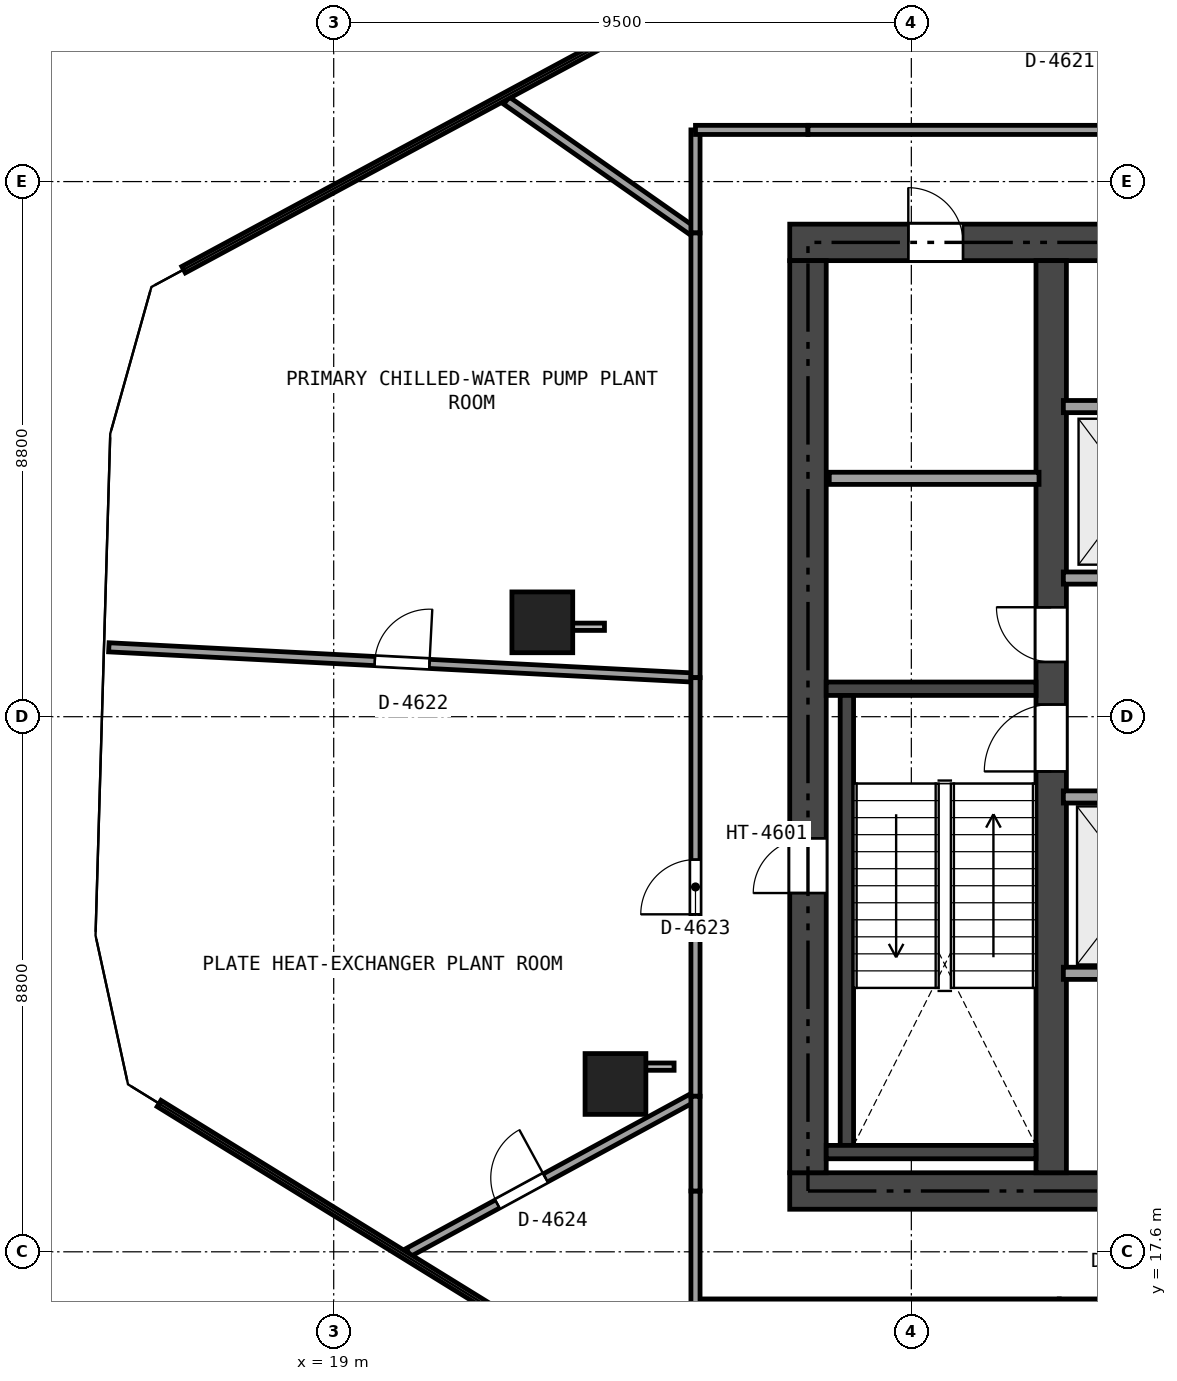
"""IFC4 building model, lengths in metres.
Left out: names, types, materials, properties, quantities, classifications, styles, units other than length and angle.
Written with IfcOpenShell. Run it as: python <this file> out.ifc"""

import sys

from ifc_helpers import new_model, si_unit, direction, frame, frame_2d, origin, origin_2d, place, context, subcontext, project, spatial, rectangle, extrude, element, fill, save


model = new_model("IFC4")
c1 = context("Model", 3, precision=1e-05, world=origin(), true_north=direction((0.0, 1.0)))
c2 = subcontext(c1, "Body", "Model", "MODEL_VIEW")
j1 = project(units=[si_unit("LENGTHUNIT", "METRE"), si_unit("PLANEANGLEUNIT", "RADIAN")], contexts=[c1])
p1 = place(None, origin())
s1 = spatial("IfcSite", under=j1, at=p1, CompositionType="ELEMENT")
p2 = place(p1, origin())
s2 = spatial("IfcBuilding", under=s1, at=p2, CompositionType="ELEMENT")
p3 = place(p2, frame((0.0, 0.0, 172.5)))
s3 = spatial("IfcBuildingStorey", under=s2, at=p3, CompositionType="ELEMENT", Elevation=172.5)
p4 = place(p3, frame((26.5, 18.6, 0.0), z_axis=(0.0, 0.0, 1.0), x_axis=(1.0, 0.0, 0.0)))
e1 = element("IfcWall", 1, at=p4, inside=s3, PredefinedType="SHEAR", context=c2, shape_type="SweptSolid", body=[
    extrude(rectangle(XDim=21.4, YDim=0.6, at=frame_2d((10.7, 0.0))), origin(), (0.0, 0.0, 1.0), 4.08),
])
p5 = place(p4, frame((12.425, 0.0, 0.0)))
e2 = element("IfcOpeningElement", 2, at=p5, cuts=e1, PredefinedType="OPENING", context=c2, shape_type="SweptSolid", body=[
    extrude(rectangle(XDim=1.15, YDim=2.15, at=frame_2d((0.575, 1.075))), frame((0.0, 0.31, 0.0), z_axis=(0.0, -1.0, 0.0), x_axis=(1.0, 0.0, 0.0)), (0.0, 0.0, 1.0), 0.62),
])
p6 = place(p4, frame((5.25, 0.0, 0.0)))
e3 = element("IfcOpeningElement", 3, at=p6, cuts=e1, PredefinedType="OPENING", context=c2, shape_type="SweptSolid", body=[
    extrude(rectangle(XDim=0.9, YDim=2.1, at=frame_2d((0.45, 1.05))), frame((0.0, 0.31, 0.0), z_axis=(0.0, -1.0, 0.0), x_axis=(1.0, 0.0, 0.0)), (0.0, 0.0, 1.0), 0.62),
])
p7 = place(p3, frame((26.5, 34.2, 0.0), z_axis=(0.0, 0.0, 1.0), x_axis=(1.0, 0.0, 0.0)))
e4 = element("IfcWall", 4, at=p7, inside=s3, PredefinedType="SHEAR", context=c2, shape_type="SweptSolid", body=[
    extrude(rectangle(XDim=21.4, YDim=0.6, at=frame_2d((10.7, 0.0))), origin(), (0.0, 0.0, 1.0), 4.08),
])
p8 = place(p7, frame((9.7, 0.0, 0.0)))
e5 = element("IfcOpeningElement", 5, at=p8, cuts=e4, PredefinedType="OPENING", context=c2, shape_type="SweptSolid", body=[
    extrude(rectangle(XDim=1.1, YDim=2.15, at=frame_2d((0.55, 1.075))), frame((0.0, 0.31, 0.0), z_axis=(0.0, -1.0, 0.0), x_axis=(1.0, 0.0, 0.0)), (0.0, 0.0, 1.0), 0.62),
])
p9 = place(p7, frame((1.95, 0.0, 0.0)))
e6 = element("IfcOpeningElement", 6, at=p9, cuts=e4, PredefinedType="OPENING", context=c2, shape_type="SweptSolid", body=[
    extrude(rectangle(XDim=0.9, YDim=2.1, at=frame_2d((0.45, 1.05))), frame((0.0, 0.31, 0.0), z_axis=(0.0, -1.0, 0.0), x_axis=(1.0, 0.0, 0.0)), (0.0, 0.0, 1.0), 0.62),
])
p10 = place(p7, frame((6.25, 0.0, 0.0)))
e7 = element("IfcOpeningElement", 7, at=p10, cuts=e4, PredefinedType="OPENING", context=c2, shape_type="SweptSolid", body=[
    extrude(rectangle(XDim=0.9, YDim=2.1, at=frame_2d((0.45, 1.05))), frame((0.0, 0.31, 0.0), z_axis=(0.0, -1.0, 0.0), x_axis=(1.0, 0.0, 0.0)), (0.0, 0.0, 1.0), 0.62),
])
p11 = place(p3, frame((26.8, 18.9, 0.0), z_axis=(0.0, 0.0, 1.0), x_axis=(0.0, 1.0, 0.0)))
e8 = element("IfcWall", 8, at=p11, inside=s3, PredefinedType="SHEAR", context=c2, shape_type="SweptSolid", body=[
    extrude(rectangle(XDim=15.0, YDim=0.6, at=frame_2d((7.5, 0.0))), origin(), (0.0, 0.0, 1.0), 4.08),
])
p12 = place(p11, frame((4.6, 0.0, 0.02)))
e9 = element("IfcOpeningElement", 9, at=p12, cuts=e8, PredefinedType="OPENING", context=c2, shape_type="SweptSolid", body=[
    extrude(rectangle(XDim=0.9, YDim=2.02, at=frame_2d((0.45, 1.01))), frame((0.0, 0.31, 0.0), z_axis=(0.0, -1.0, 0.0), x_axis=(1.0, 0.0, 0.0)), (0.0, 0.0, 1.0), 0.62),
])
p13 = place(p3, frame((30.8, 18.9, 0.0), z_axis=(0.0, 0.0, 1.0), x_axis=(0.0, 1.0, 0.0)))
e10 = element("IfcWall", 10, at=p13, inside=s3, PredefinedType="SHEAR", context=c2, shape_type="SweptSolid", body=[
    extrude(rectangle(XDim=15.0, YDim=0.5, at=frame_2d((7.5, 0.0))), origin(), (0.0, 0.0, 1.0), 4.08),
])
p14 = place(p13, frame((6.6, 0.0, 0.0)))
e11 = element("IfcOpeningElement", 11, at=p14, cuts=e10, PredefinedType="OPENING", context=c2, shape_type="SweptSolid", body=[
    extrude(rectangle(XDim=1.1, YDim=2.15, at=frame_2d((0.55, 1.075))), frame((0.0, 0.26, 0.0), z_axis=(0.0, -1.0, 0.0), x_axis=(1.0, 0.0, 0.0)), (0.0, 0.0, 1.0), 0.52),
])
p15 = place(p13, frame((8.4, 0.0, 0.0)))
e12 = element("IfcOpeningElement", 12, at=p15, cuts=e10, PredefinedType="OPENING", context=c2, shape_type="SweptSolid", body=[
    extrude(rectangle(XDim=0.9, YDim=2.1, at=frame_2d((0.45, 1.05))), frame((0.0, 0.26, 0.0), z_axis=(0.0, -1.0, 0.0), x_axis=(1.0, 0.0, 0.0)), (0.0, 0.0, 1.0), 0.52),
])
p16 = place(p3, frame((27.1, 26.86, 0.0), z_axis=(0.0, 0.0, 1.0), x_axis=(1.0, 0.0, 0.0)))
e13 = element("IfcWall", 13, at=p16, inside=s3, PredefinedType="SHEAR", context=c2, shape_type="SweptSolid", body=[
    extrude(rectangle(XDim=3.45, YDim=0.22, at=frame_2d((1.725, 0.0))), origin(), (0.0, 0.0, 1.0), 4.08),
])
p17 = place(p3, frame((27.44, 19.35, 0.0), z_axis=(0.0, 0.0, 1.0), x_axis=(0.0, 1.0, 0.0)))
e14 = element("IfcWall", 14, at=p17, inside=s3, PredefinedType="SHEAR", context=c2, shape_type="SweptSolid", body=[
    extrude(rectangle(XDim=7.4, YDim=0.22, at=frame_2d((3.7, 0.0))), origin(), (0.0, 0.0, 1.0), 4.08),
])
p18 = place(p3, frame((27.1, 19.24, 0.0), z_axis=(0.0, 0.0, 1.0), x_axis=(1.0, 0.0, 0.0)))
e15 = element("IfcWall", 15, at=p18, inside=s3, PredefinedType="SHEAR", context=c2, shape_type="SweptSolid", body=[
    extrude(rectangle(XDim=3.45, YDim=0.22, at=frame_2d((1.725, 0.0))), origin(), (0.0, 0.0, 1.0), 4.08),
])
for number, where, z_axis, x_axis in (
    (16, (22.431, 27.952, 0.0), (0.0, 0.0, 1.0), (1.0, 0.0, 0.0)),
    (17, (23.634, 20.36, 0.0), (0.0, 0.0, 1.0), (1.0, 0.0, 0.0)),
):
    element("IfcColumn", number, at=place(p3, frame(where, z_axis=z_axis, x_axis=x_axis)), inside=s3, PredefinedType="COLUMN", context=c2, shape_type="SweptSolid", body=[
        extrude(rectangle(XDim=1.0, YDim=1.0, at=origin_2d()), origin(), (0.0, 0.0, 1.0), 4.08),
    ])
p19 = place(p3, frame((27.15, 30.32, 0.0), z_axis=(0.0, 0.0, 1.0), x_axis=(1.0, 0.0, 0.0)))
e18 = element("IfcWall", 18, at=p19, inside=s3, PredefinedType="SOLIDWALL", context=c2, shape_type="SweptSolid", body=[
    extrude(rectangle(XDim=3.45, YDim=0.2, at=frame_2d((1.725, 0.0))), origin(), (0.0, 0.0, 1.0), 4.08),
])
p20 = place(p3, frame((31.0, 28.68, 0.0), z_axis=(0.0, 0.0, 1.0), x_axis=(1.0, 0.0, 0.0)))
e19 = element("IfcWall", 19, at=p20, inside=s3, PredefinedType="SOLIDWALL", context=c2, shape_type="SweptSolid", body=[
    extrude(rectangle(XDim=4.42, YDim=0.2, at=frame_2d((2.21, 0.0))), origin(), (0.0, 0.0, 1.0), 4.08),
])
p21 = place(p20, frame((0.6, 0.0, 0.0)))
e20 = element("IfcOpeningElement", 20, at=p21, cuts=e19, PredefinedType="OPENING", context=c2, shape_type="SweptSolid", body=[
    extrude(rectangle(XDim=1.1, YDim=2.15, at=frame_2d((0.55, 1.075))), frame((0.0, 0.11, 0.0), z_axis=(0.0, -1.0, 0.0), x_axis=(1.0, 0.0, 0.0)), (0.0, 0.0, 1.0), 0.22),
])
p22 = place(p20, frame((2.85, 0.0, 0.0)))
e21 = element("IfcOpeningElement", 21, at=p22, cuts=e19, PredefinedType="OPENING", context=c2, shape_type="SweptSolid", body=[
    extrude(rectangle(XDim=1.1, YDim=2.15, at=frame_2d((0.55, 1.075))), frame((0.0, 0.11, 0.0), z_axis=(0.0, -1.0, 0.0), x_axis=(1.0, 0.0, 0.0)), (0.0, 0.0, 1.0), 0.22),
])
p23 = place(p3, frame((31.0, 31.5, 0.0), z_axis=(0.0, 0.0, 1.0), x_axis=(1.0, 0.0, 0.0)))
e22 = element("IfcWall", 22, at=p23, inside=s3, PredefinedType="SOLIDWALL", context=c2, shape_type="SweptSolid", body=[
    extrude(rectangle(XDim=4.42, YDim=0.2, at=frame_2d((2.21, 0.0))), origin(), (0.0, 0.0, 1.0), 4.08),
])
p24 = place(p3, frame((31.0, 25.08, 0.0), z_axis=(0.0, 0.0, 1.0), x_axis=(1.0, 0.0, 0.0)))
e23 = element("IfcWall", 23, at=p24, inside=s3, PredefinedType="SOLIDWALL", context=c2, shape_type="SweptSolid", body=[
    extrude(rectangle(XDim=4.42, YDim=0.2, at=frame_2d((2.21, 0.0))), origin(), (0.0, 0.0, 1.0), 4.08),
])
p25 = place(p24, frame((3.0, 0.0, 0.0)))
e24 = element("IfcOpeningElement", 24, at=p25, cuts=e23, PredefinedType="OPENING", context=c2, shape_type="SweptSolid", body=[
    extrude(rectangle(XDim=0.9, YDim=2.1, at=frame_2d((0.45, 1.05))), frame((0.0, 0.11, 0.0), z_axis=(0.0, -1.0, 0.0), x_axis=(1.0, 0.0, 0.0)), (0.0, 0.0, 1.0), 0.22),
])
p26 = place(p24, frame((0.62, 0.0, 0.0)))
e25 = element("IfcOpeningElement", 25, at=p26, cuts=e23, PredefinedType="OPENING", context=c2, shape_type="SweptSolid", body=[
    extrude(rectangle(XDim=1.2, YDim=2.15, at=frame_2d((0.6, 1.075))), frame((0.0, 0.11, 0.0), z_axis=(0.0, -1.0, 0.0), x_axis=(1.0, 0.0, 0.0)), (0.0, 0.0, 1.0), 0.22),
])
p27 = place(p3, frame((31.0, 22.18, 0.0), z_axis=(0.0, 0.0, 1.0), x_axis=(1.0, 0.0, 0.0)))
e26 = element("IfcWall", 26, at=p27, inside=s3, PredefinedType="SOLIDWALL", context=c2, shape_type="SweptSolid", body=[
    extrude(rectangle(XDim=2.42, YDim=0.2, at=frame_2d((1.21, 0.0))), origin(), (0.0, 0.0, 1.0), 4.08),
])
p28 = place(p3, frame((29.839, 40.833, 0.0), z_axis=(0.0, 0.0, 1.0), x_axis=(0.454996530665, -0.890493210015, 0.0)))
e27 = element("IfcWall", 27, at=p28, inside=s3, PredefinedType="PARTITIONING", context=c2, shape_type="SweptSolid", body=[
    extrude(rectangle(XDim=5.371, YDim=0.15, at=frame_2d((2.686, 0.0))), origin(), (0.0, 0.0, 1.0), 3.565),
])
p29 = place(p28, frame((3.091, 0.0, 0.0)))
e28 = element("IfcOpeningElement", 28, at=p29, cuts=e27, PredefinedType="OPENING", context=c2, shape_type="SweptSolid", body=[
    extrude(rectangle(XDim=0.9, YDim=2.0, at=frame_2d((0.45, 1.0))), frame((0.0, 0.085, 0.0), z_axis=(0.0, -1.0, 0.0), x_axis=(1.0, 0.0, 0.0)), (0.0, 0.0, 1.0), 0.17),
])
p30 = place(p3, frame((21.841, 36.533, 0.0), z_axis=(0.0, 0.0, 1.0), x_axis=(0.819014305643, -0.573773097271, 0.0)))
e29 = element("IfcWall", 29, at=p30, inside=s3, PredefinedType="PARTITIONING", context=c2, shape_type="SweptSolid", body=[
    extrude(rectangle(XDim=3.796, YDim=0.15, at=frame_2d((1.898, 0.0))), origin(), (0.0, 0.0, 1.0), 4.08),
])
p31 = place(p3, frame((24.95, 34.355, 0.0), z_axis=(0.0, 0.0, 1.0), x_axis=(0.0, 1.0, 0.0)))
e30 = element("IfcWall", 30, at=p31, inside=s3, PredefinedType="PARTITIONING", context=c2, shape_type="SweptSolid", body=[
    extrude(rectangle(XDim=1.695, YDim=0.15, at=frame_2d((0.848, 0.0))), origin(), (0.0, 0.0, 1.0), 4.08),
])
p32 = place(p3, frame((24.95, 36.05, 0.0), z_axis=(0.0, 0.0, 1.0), x_axis=(1.0, 0.0, 0.0)))
e31 = element("IfcWall", 31, at=p32, inside=s3, PredefinedType="PARTITIONING", context=c2, shape_type="SweptSolid", body=[
    extrude(rectangle(XDim=1.85, YDim=0.15, at=frame_2d((0.925, 0.0))), origin(), (0.0, 0.0, 1.0), 4.08),
])
p33 = place(p3, frame((26.8, 36.05, 0.0), z_axis=(0.0, 0.0, 1.0), x_axis=(1.0, 0.0, 0.0)))
e32 = element("IfcWall", 32, at=p33, inside=s3, PredefinedType="PARTITIONING", context=c2, shape_type="SweptSolid", body=[
    extrude(rectangle(XDim=5.483, YDim=0.15, at=frame_2d((2.741, 0.0))), origin(), (0.0, 0.0, 1.0), 3.065),
])
p34 = place(p3, frame((15.302, 27.541, 0.0), z_axis=(0.0, 0.0, 1.0), x_axis=(0.998665029895, -0.051654216334, 0.0)))
e33 = element("IfcWall", 33, at=p34, inside=s3, PredefinedType="PARTITIONING", context=c2, shape_type="SweptSolid", body=[
    extrude(rectangle(XDim=9.661, YDim=0.15, at=frame_2d((4.831, 0.0))), origin(), (0.0, 0.0, 1.0), 3.565),
])
p35 = place(p34, frame((4.38, 0.0, 0.0)))
e34 = element("IfcOpeningElement", 34, at=p35, cuts=e33, PredefinedType="OPENING", context=c2, shape_type="SweptSolid", body=[
    extrude(rectangle(XDim=0.9, YDim=2.0, at=frame_2d((0.45, 1.0))), frame((0.0, 0.085, 0.0), z_axis=(0.0, -1.0, 0.0), x_axis=(1.0, 0.0, 0.0)), (0.0, 0.0, 1.0), 0.17),
])
p36 = place(p3, frame((24.95, 27.042, 0.0), z_axis=(0.0, 0.0, 1.0), x_axis=(0.0, 1.0, 0.0)))
e35 = element("IfcWall", 35, at=p36, inside=s3, PredefinedType="PARTITIONING", context=c2, shape_type="SweptSolid", body=[
    extrude(rectangle(XDim=7.313, YDim=0.15, at=frame_2d((3.656, 0.0))), origin(), (0.0, 0.0, 1.0), 3.065),
])
p37 = place(p3, frame((20.228, 17.589, 0.0), z_axis=(0.0, 0.0, 1.0), x_axis=(0.878422694628, 0.47788447303, 0.0)))
e36 = element("IfcWall", 36, at=p37, inside=s3, PredefinedType="PARTITIONING", context=c2, shape_type="SweptSolid", body=[
    extrude(rectangle(XDim=5.375, YDim=0.15, at=frame_2d((2.688, 0.0))), origin(), (0.0, 0.0, 1.0), 3.565),
])
p38 = place(p37, frame((1.667, 0.0, 0.0)))
e37 = element("IfcOpeningElement", 37, at=p38, cuts=e36, PredefinedType="OPENING", context=c2, shape_type="SweptSolid", body=[
    extrude(rectangle(XDim=0.9, YDim=2.0, at=frame_2d((0.45, 1.0))), frame((0.0, 0.085, 0.0), z_axis=(0.0, -1.0, 0.0), x_axis=(1.0, 0.0, 0.0)), (0.0, 0.0, 1.0), 0.17),
])
p39 = place(p3, frame((24.95, 20.158, 0.0), z_axis=(0.0, 0.0, 1.0), x_axis=(0.0, 1.0, 0.0)))
e38 = element("IfcWall", 38, at=p39, inside=s3, PredefinedType="PARTITIONING", context=c2, shape_type="SweptSolid", body=[
    extrude(rectangle(XDim=6.884, YDim=0.15, at=frame_2d((3.442, 0.0))), origin(), (0.0, 0.0, 1.0), 3.065),
])
p40 = place(p39, frame((2.992, 0.0, 0.0)))
e39 = element("IfcOpeningElement", 39, at=p40, cuts=e38, PredefinedType="OPENING", context=c2, shape_type="SweptSolid", body=[
    extrude(rectangle(XDim=0.9, YDim=2.0, at=frame_2d((0.45, 1.0))), frame((0.0, 0.085, 0.0), z_axis=(0.0, -1.0, 0.0), x_axis=(1.0, 0.0, 0.0)), (0.0, 0.0, 1.0), 0.17),
])
p41 = place(p3, frame((30.933, 16.75, 0.0), z_axis=(0.0, 0.0, 1.0), x_axis=(-1.0, 0.0, 0.0)))
e40 = element("IfcWall", 40, at=p41, inside=s3, PredefinedType="PARTITIONING", context=c2, shape_type="SweptSolid", body=[
    extrude(rectangle(XDim=5.983, YDim=0.15, at=frame_2d((2.992, 0.0))), origin(), (0.0, 0.0, 1.0), 3.565),
])
p42 = place(p3, frame((24.95, 16.75, 0.0), z_axis=(0.0, 0.0, 1.0), x_axis=(0.0, 1.0, 0.0)))
e41 = element("IfcWall", 41, at=p42, inside=s3, PredefinedType="PARTITIONING", context=c2, shape_type="SweptSolid", body=[
    extrude(rectangle(XDim=1.85, YDim=0.15, at=frame_2d((0.925, 0.0))), origin(), (0.0, 0.0, 1.0), 4.08),
])
p43 = place(p3, frame((24.95, 18.6, 0.0), z_axis=(0.0, 0.0, 1.0), x_axis=(0.0, 1.0, 0.0)))
e42 = element("IfcWall", 42, at=p43, inside=s3, PredefinedType="PARTITIONING", context=c2, shape_type="SweptSolid", body=[
    extrude(rectangle(XDim=1.558, YDim=0.15, at=frame_2d((0.779, 0.0))), origin(), (0.0, 0.0, 1.0), 3.565),
])
p44 = place(p3, frame((36.694, 16.75, 0.0), z_axis=(0.0, 0.0, 1.0), x_axis=(-1.0, 0.0, 0.0)))
e43 = element("IfcWall", 43, at=p44, inside=s3, PredefinedType="PARTITIONING", context=c2, shape_type="SweptSolid", body=[
    extrude(rectangle(XDim=5.761, YDim=0.15, at=frame_2d((2.88, 0.0))), origin(), (0.0, 0.0, 1.0), 3.065),
])
p45 = place(p44, frame((3.995, 0.0, 0.0)))
e44 = element("IfcOpeningElement", 44, at=p45, cuts=e43, PredefinedType="OPENING", context=c2, shape_type="SweptSolid", body=[
    extrude(rectangle(XDim=0.9, YDim=2.0, at=frame_2d((0.45, 1.0))), frame((0.0, 0.085, 0.0), z_axis=(0.0, -1.0, 0.0), x_axis=(1.0, 0.0, 0.0)), (0.0, 0.0, 1.0), 0.17),
])
p46 = place(p12, origin())
e45 = element("IfcDoor", 45, at=p46, inside=s3, OperationType="SINGLE_SWING_LEFT", PredefinedType="TRAPDOOR", context=c2, shape_type="SweptSolid", body=[
    extrude(rectangle(XDim=0.9, YDim=2.02, at=frame_2d((0.45, 1.01))), frame((0.0, 0.025, 0.0), z_axis=(0.0, -1.0, 0.0), x_axis=(1.0, 0.0, 0.0)), (0.0, 0.0, 1.0), 0.05),
])
fill(e9, e45)
p47 = place(p14, origin())
e46 = element("IfcDoor", 46, at=p47, inside=s3, OperationType="SINGLE_SWING_LEFT", PredefinedType="DOOR", context=c2, shape_type="SweptSolid", body=[
    extrude(rectangle(XDim=1.1, YDim=2.15, at=frame_2d((0.55, 1.075))), frame((0.0, 0.025, 0.0), z_axis=(0.0, -1.0, 0.0), x_axis=(1.0, 0.0, 0.0)), (0.0, 0.0, 1.0), 0.05),
])
fill(e11, e46)
p48 = place(p15, origin())
e47 = element("IfcDoor", 47, at=p48, inside=s3, OperationType="SINGLE_SWING_RIGHT", PredefinedType="DOOR", context=c2, shape_type="SweptSolid", body=[
    extrude(rectangle(XDim=0.9, YDim=2.1, at=frame_2d((0.45, 1.05))), frame((0.0, 0.025, 0.0), z_axis=(0.0, -1.0, 0.0), x_axis=(1.0, 0.0, 0.0)), (0.0, 0.0, 1.0), 0.05),
])
fill(e12, e47)
p49 = place(p9, origin())
e48 = element("IfcDoor", 48, at=p49, inside=s3, OperationType="SINGLE_SWING_LEFT", PredefinedType="DOOR", context=c2, shape_type="SweptSolid", body=[
    extrude(rectangle(XDim=0.9, YDim=2.1, at=frame_2d((0.45, 1.05))), frame((0.0, 0.025, 0.0), z_axis=(0.0, -1.0, 0.0), x_axis=(1.0, 0.0, 0.0)), (0.0, 0.0, 1.0), 0.05),
])
fill(e6, e48)
p50 = place(p29, origin())
e49 = element("IfcDoor", 49, at=p50, inside=s3, OperationType="SINGLE_SWING_LEFT", PredefinedType="DOOR", context=c2, shape_type="SweptSolid", body=[
    extrude(rectangle(XDim=0.9, YDim=2.0, at=frame_2d((0.45, 1.0))), frame((0.0, 0.025, 0.0), z_axis=(0.0, -1.0, 0.0), x_axis=(1.0, 0.0, 0.0)), (0.0, 0.0, 1.0), 0.05),
])
fill(e28, e49)
p51 = place(p35, origin())
e50 = element("IfcDoor", 50, at=p51, inside=s3, OperationType="SINGLE_SWING_RIGHT", PredefinedType="DOOR", context=c2, shape_type="SweptSolid", body=[
    extrude(rectangle(XDim=0.9, YDim=2.0, at=frame_2d((0.45, 1.0))), frame((0.0, 0.025, 0.0), z_axis=(0.0, -1.0, 0.0), x_axis=(1.0, 0.0, 0.0)), (0.0, 0.0, 1.0), 0.05),
])
fill(e34, e50)
p52 = place(p40, origin())
e51 = element("IfcDoor", 51, at=p52, inside=s3, OperationType="SINGLE_SWING_LEFT", PredefinedType="DOOR", context=c2, shape_type="SweptSolid", body=[
    extrude(rectangle(XDim=0.9, YDim=2.0, at=frame_2d((0.45, 1.0))), frame((0.0, 0.025, 0.0), z_axis=(0.0, -1.0, 0.0), x_axis=(1.0, 0.0, 0.0)), (0.0, 0.0, 1.0), 0.05),
])
fill(e39, e51)
p53 = place(p38, origin())
e52 = element("IfcDoor", 52, at=p53, inside=s3, OperationType="SINGLE_SWING_RIGHT", PredefinedType="DOOR", context=c2, shape_type="SweptSolid", body=[
    extrude(rectangle(XDim=0.9, YDim=2.0, at=frame_2d((0.45, 1.0))), frame((0.0, 0.025, 0.0), z_axis=(0.0, -1.0, 0.0), x_axis=(1.0, 0.0, 0.0)), (0.0, 0.0, 1.0), 0.05),
])
fill(e37, e52)
save(model, sys.argv[1])
